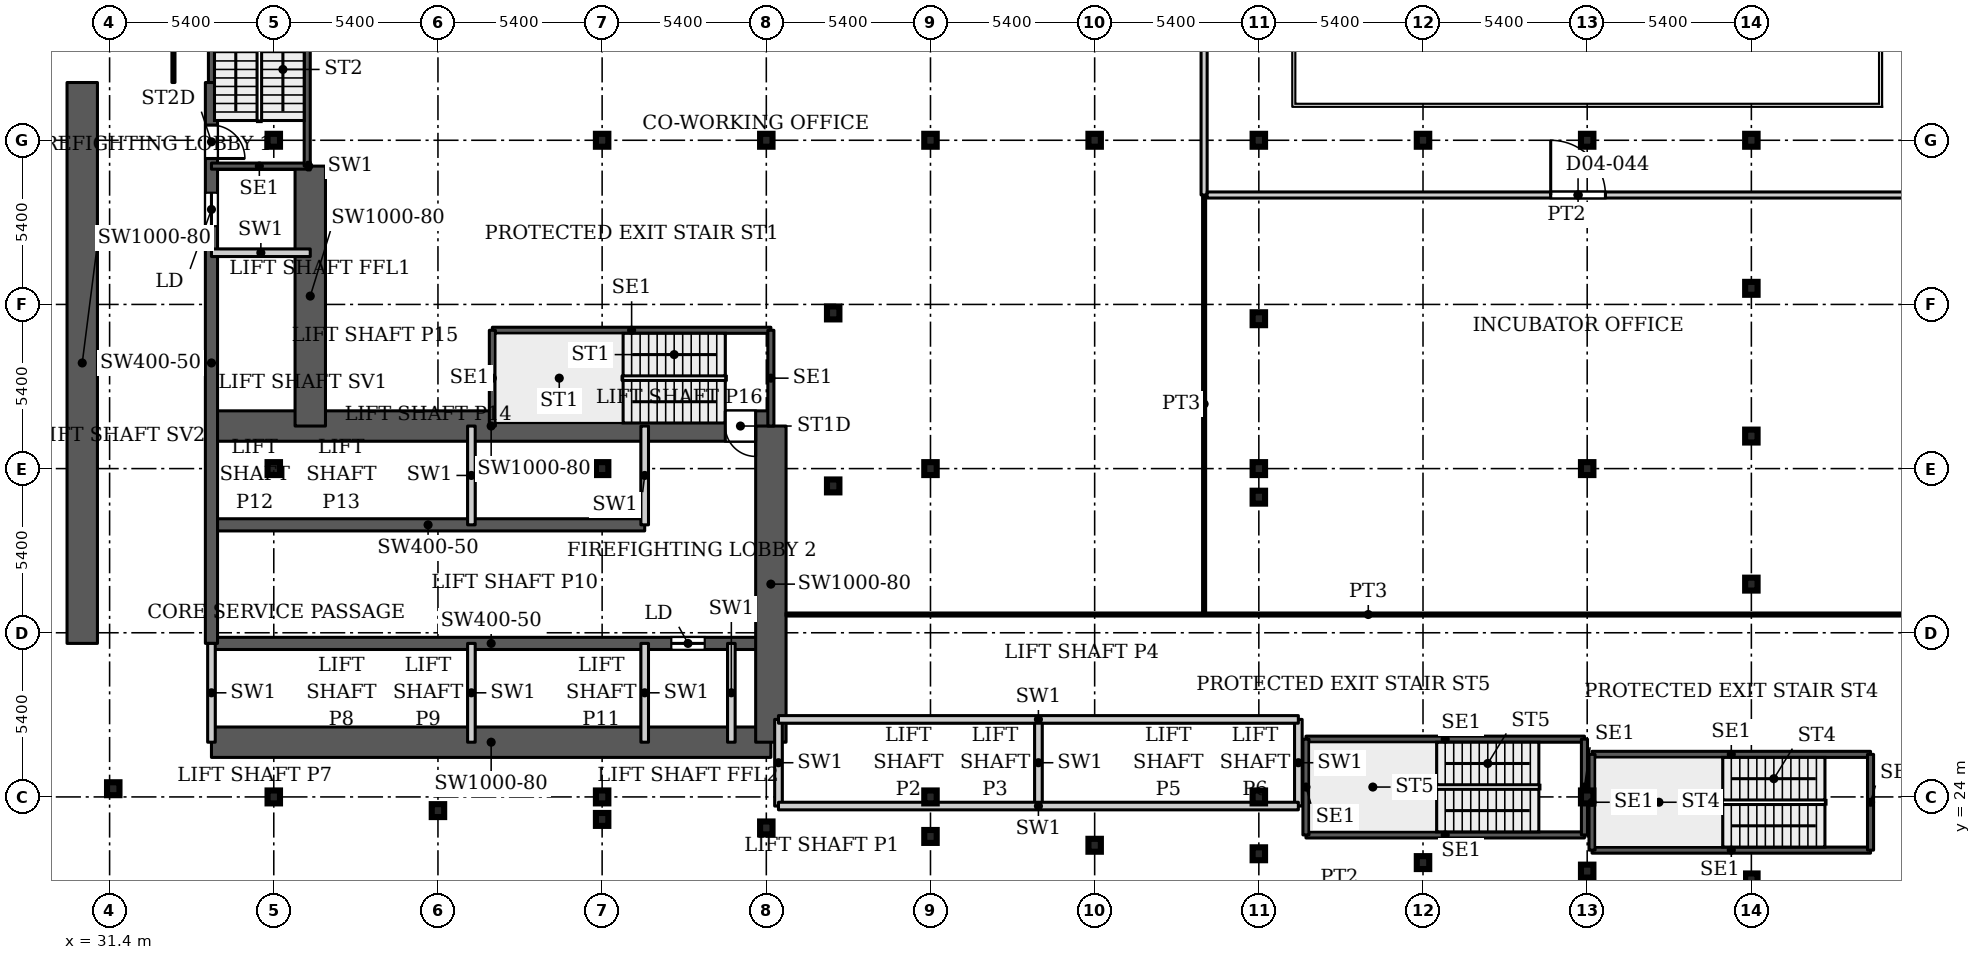
"""IFC4 building model, lengths in metres.
Left out: names, types, materials, properties, quantities, classifications, styles, units other than length and angle.
Written with IfcOpenShell. Run it as: python <this file> out.ifc"""

import sys

from ifc_helpers import new_model, si_unit, direction, frame, frame_2d, origin, origin_2d, place, context, subcontext, project, spatial, rectangle, i_section, extrude, source, transform, mapped, element, fill, save


model = new_model("IFC4")
c1 = context("Model", 3, precision=1e-05, world=origin(), true_north=direction((0.0, 1.0)))
c2 = subcontext(c1, "Body", "Model", "MODEL_VIEW")
j1 = project(units=[si_unit("LENGTHUNIT", "METRE"), si_unit("PLANEANGLEUNIT", "RADIAN")], contexts=[c1])
p1 = place(None, origin())
s1 = spatial("IfcSite", under=j1, at=p1, CompositionType="ELEMENT")
p2 = place(p1, origin())
s2 = spatial("IfcBuilding", under=s1, at=p2, CompositionType="ELEMENT")
p3 = place(p2, frame((0.0, 0.0, 21.5)))
s3 = spatial("IfcBuildingStorey", under=s2, at=p3, CompositionType="ELEMENT", Elevation=21.5)
for number, where, z_axis, x_axis in (
    (1, (36.8, 24.0, 0.0), (0.0, 0.0, 1.0), (1.0, 0.0, 0.0)),
    (2, (47.6, 24.0, 0.0), (0.0, 0.0, 1.0), (1.0, 0.0, 0.0)),
    (3, (58.4, 24.0, 0.0), (0.0, 0.0, 1.0), (1.0, 0.0, 0.0)),
    (4, (69.2, 24.0, 0.0), (0.0, 0.0, 1.0), (1.0, 0.0, 0.0)),
    (5, (80.0, 24.0, 0.0), (0.0, 0.0, 1.0), (1.0, 0.0, 0.0)),
    (6, (36.8, 34.8, 0.0), (0.0, 0.0, 1.0), (1.0, 0.0, 0.0)),
    (7, (47.6, 34.8, 0.0), (0.0, 0.0, 1.0), (1.0, 0.0, 0.0)),
    (8, (58.4, 34.8, 0.0), (0.0, 0.0, 1.0), (1.0, 0.0, 0.0)),
    (9, (69.2, 34.8, 0.0), (0.0, 0.0, 1.0), (1.0, 0.0, 0.0)),
    (10, (80.0, 34.8, 0.0), (0.0, 0.0, 1.0), (1.0, 0.0, 0.0)),
    (11, (36.8, 45.6, 0.0), (0.0, 0.0, 1.0), (1.0, 0.0, 0.0)),
    (12, (47.6, 45.6, 0.0), (0.0, 0.0, 1.0), (1.0, 0.0, 0.0)),
    (13, (58.4, 45.6, 0.0), (0.0, 0.0, 1.0), (1.0, 0.0, 0.0)),
    (14, (69.2, 45.6, 0.0), (0.0, 0.0, 1.0), (1.0, 0.0, 0.0)),
    (15, (80.0, 45.6, 0.0), (0.0, 0.0, 1.0), (1.0, 0.0, 0.0)),
    (16, (85.4, 21.27, 0.0), (0.0, 0.0, 1.0), (1.0, 0.0, 0.0)),
    (17, (80.0, 21.56, 0.0), (0.0, 0.0, 1.0), (1.0, 0.0, 0.0)),
    (18, (74.6, 21.84, 0.0), (0.0, 0.0, 1.0), (1.0, 0.0, 0.0)),
    (19, (69.2, 22.13, 0.0), (0.0, 0.0, 1.0), (1.0, 0.0, 0.0)),
    (20, (63.8, 22.41, 0.0), (0.0, 0.0, 1.0), (1.0, 0.0, 0.0)),
    (21, (58.4, 22.7, 0.0), (0.0, 0.0, 1.0), (1.0, 0.0, 0.0)),
    (22, (53.0, 22.98, 0.0), (0.0, 0.0, 1.0), (1.0, 0.0, 0.0)),
    (23, (47.6, 23.26, 0.0), (0.0, 0.0, 1.0), (1.0, 0.0, 0.0)),
    (24, (42.2, 23.55, 0.0), (0.0, 0.0, 1.0), (1.0, 0.0, 0.0)),
    (25, (31.52, 24.27, 0.0), (0.0, 0.0, 1.0), (1.0, 0.0, 0.0)),
    (26, (53.0, 45.6, 0.0), (0.0, 0.0, 1.0), (1.0, 0.0, 0.0)),
    (27, (63.8, 45.6, 0.0), (0.0, 0.0, 1.0), (1.0, 0.0, 0.0)),
    (28, (74.6, 45.6, 0.0), (0.0, 0.0, 1.0), (1.0, 0.0, 0.0)),
    (29, (85.4, 45.6, 0.0), (0.0, 0.0, 1.0), (1.0, 0.0, 0.0)),
    (30, (85.4, 31.0, 0.0), (0.0, 0.0, 1.0), (1.0, 0.0, 0.0)),
    (31, (69.2, 33.86, 0.0), (0.0, 0.0, 1.0), (1.0, 0.0, 0.0)),
    (32, (55.2, 34.23, 0.0), (0.0, 0.0, 1.0), (1.0, 0.0, 0.0)),
    (33, (85.4, 35.87, 0.0), (0.0, 0.0, 1.0), (1.0, 0.0, 0.0)),
    (34, (69.2, 39.73, 0.0), (0.0, 0.0, 1.0), (1.0, 0.0, 0.0)),
    (35, (55.2, 39.92, 0.0), (0.0, 0.0, 1.0), (1.0, 0.0, 0.0)),
    (36, (85.4, 40.73, 0.0), (0.0, 0.0, 1.0), (1.0, 0.0, 0.0)),
):
    element("IfcColumn", number, at=place(p3, frame(where, z_axis=z_axis, x_axis=x_axis)), inside=s3, PredefinedType="COLUMN", context=c2, shape_type="SweptSolid", body=[
        extrude(i_section(OverallWidth=0.409, OverallDepth=0.425, WebThickness=0.033, FlangeThickness=0.052, FilletRadius=0.013, at=origin_2d()), origin(), (0.0, 0.0, 1.0), 4.5),
    ])
p4 = place(p3, frame((34.75, 25.8, 0.0), z_axis=(0.0, 0.0, 1.0), x_axis=(1.0, 0.0, 0.0)))
e37 = element("IfcWall", 37, at=p4, inside=s3, PredefinedType="SHEAR", context=c2, shape_type="SweptSolid", body=[
    extrude(rectangle(XDim=18.4, YDim=1.0, at=frame_2d((9.2, 0.0))), origin(), (0.0, 0.0, 1.0), 4.5),
])
p5 = place(p3, frame((34.75, 29.05, 0.0), z_axis=(0.0, 0.0, 1.0), x_axis=(1.0, 0.0, 0.0)))
e38 = element("IfcWall", 38, at=p5, inside=s3, PredefinedType="SHEAR", context=c2, shape_type="SweptSolid", body=[
    extrude(rectangle(XDim=18.4, YDim=0.4, at=frame_2d((9.2, 0.0))), origin(), (0.0, 0.0, 1.0), 4.5),
])
p6 = place(p5, frame((15.125, 0.0, 0.0)))
e39 = element("IfcOpeningElement", 39, at=p6, cuts=e38, PredefinedType="OPENING", context=c2, shape_type="SweptSolid", body=[
    extrude(rectangle(XDim=1.1, YDim=2.2, at=frame_2d((0.55, 1.1))), frame((0.0, 0.21, 0.0), z_axis=(0.0, -1.0, 0.0), x_axis=(1.0, 0.0, 0.0)), (0.0, 0.0, 1.0), 0.42),
])
p7 = place(p3, frame((34.75, 32.95, 0.0), z_axis=(0.0, 0.0, 1.0), x_axis=(1.0, 0.0, 0.0)))
e40 = element("IfcWall", 40, at=p7, inside=s3, PredefinedType="SHEAR", context=c2, shape_type="SweptSolid", body=[
    extrude(rectangle(XDim=14.25, YDim=0.4, at=frame_2d((7.125, 0.0))), origin(), (0.0, 0.0, 1.0), 4.5),
])
p8 = place(p3, frame((34.75, 36.2, 0.0), z_axis=(0.0, 0.0, 1.0), x_axis=(1.0, 0.0, 0.0)))
e41 = element("IfcWall", 41, at=p8, inside=s3, PredefinedType="SHEAR", context=c2, shape_type="SweptSolid", body=[
    extrude(rectangle(XDim=18.4, YDim=1.0, at=frame_2d((9.2, 0.0))), origin(), (0.0, 0.0, 1.0), 4.5),
])
p9 = place(p8, frame((16.9, 0.0, 0.0)))
e42 = element("IfcOpeningElement", 42, at=p9, cuts=e41, PredefinedType="OPENING", context=c2, shape_type="SweptSolid", body=[
    extrude(rectangle(XDim=1.0, YDim=2.2, at=frame_2d((0.5, 1.1))), frame((0.0, 0.51, 0.0), z_axis=(0.0, -1.0, 0.0), x_axis=(1.0, 0.0, 0.0)), (0.0, 0.0, 1.0), 1.02),
])
p10 = place(p3, frame((34.75, 29.05, 0.0), z_axis=(0.0, 0.0, 1.0), x_axis=(0.0, 1.0, 0.0)))
e43 = element("IfcWall", 43, at=p10, inside=s3, PredefinedType="SHEAR", context=c2, shape_type="SweptSolid", body=[
    extrude(rectangle(XDim=18.45, YDim=0.4, at=frame_2d((9.225, 0.0))), origin(), (0.0, 0.0, 1.0), 4.5),
])
p11 = place(p10, frame((13.725, 0.0, 0.0)))
e44 = element("IfcOpeningElement", 44, at=p11, cuts=e43, PredefinedType="OPENING", context=c2, shape_type="SweptSolid", body=[
    extrude(rectangle(XDim=1.1, YDim=2.2, at=frame_2d((0.55, 1.1))), frame((0.0, 0.21, 0.0), z_axis=(0.0, -1.0, 0.0), x_axis=(1.0, 0.0, 0.0)), (0.0, 0.0, 1.0), 0.42),
])
p12 = place(p10, frame((15.95, 0.0, 0.0)))
e45 = element("IfcOpeningElement", 45, at=p12, cuts=e43, PredefinedType="OPENING", context=c2, shape_type="SweptSolid", body=[
    extrude(rectangle(XDim=1.1, YDim=2.2, at=frame_2d((0.55, 1.1))), frame((0.0, 0.21, 0.0), z_axis=(0.0, -1.0, 0.0), x_axis=(1.0, 0.0, 0.0)), (0.0, 0.0, 1.0), 0.42),
])
p13 = place(p3, frame((38.0, 36.2, 0.0), z_axis=(0.0, 0.0, 1.0), x_axis=(0.0, 1.0, 0.0)))
e46 = element("IfcWall", 46, at=p13, inside=s3, PredefinedType="SHEAR", context=c2, shape_type="SweptSolid", body=[
    extrude(rectangle(XDim=8.55, YDim=1.0, at=frame_2d((4.275, 0.0))), origin(), (0.0, 0.0, 1.0), 4.5),
])
p14 = place(p3, frame((30.5, 29.05, 0.0), z_axis=(0.0, 0.0, 1.0), x_axis=(0.0, 1.0, 0.0)))
e47 = element("IfcWall", 47, at=p14, inside=s3, PredefinedType="SHEAR", context=c2, shape_type="SweptSolid", body=[
    extrude(rectangle(XDim=18.45, YDim=1.0, at=frame_2d((9.225, 0.0))), origin(), (0.0, 0.0, 1.0), 4.5),
])
p15 = place(p3, frame((53.15, 25.8, 0.0), z_axis=(0.0, 0.0, 1.0), x_axis=(0.0, 1.0, 0.0)))
e48 = element("IfcWall", 48, at=p15, inside=s3, PredefinedType="SHEAR", context=c2, shape_type="SweptSolid", body=[
    extrude(rectangle(XDim=10.4, YDim=1.0, at=frame_2d((5.2, 0.0))), origin(), (0.0, 0.0, 1.0), 4.5),
])
p16 = place(p3, frame((43.99, 39.35, 0.0), z_axis=(0.0, 0.0, 1.0), x_axis=(1.0, 0.0, 0.0)))
e49 = element("IfcWall", 49, at=p16, inside=s3, PredefinedType="SHEAR", context=c2, shape_type="SweptSolid", body=[
    extrude(rectangle(XDim=9.16, YDim=0.2, at=frame_2d((4.58, 0.0))), origin(), (0.0, 0.0, 1.0), 4.5),
])
for number, where, z_axis, x_axis in (
    (50, (43.99, 36.2, 0.0), (0.0, 0.0, 1.0), (0.0, 1.0, 0.0)),
    (51, (53.15, 36.2, 0.0), (0.0, 0.0, 1.0), (0.0, 1.0, 0.0)),
):
    element("IfcWall", number, at=place(p3, frame(where, z_axis=z_axis, x_axis=x_axis)), inside=s3, PredefinedType="SHEAR", context=c2, shape_type="SweptSolid", body=[
        extrude(rectangle(XDim=3.15, YDim=0.2, at=frame_2d((1.575, 0.0))), origin(), (0.0, 0.0, 1.0), 4.5),
    ])
p17 = place(p3, frame((34.75, 44.75, 0.0), z_axis=(0.0, 0.0, 1.0), x_axis=(1.0, 0.0, 0.0)))
e52 = element("IfcWall", 52, at=p17, inside=s3, PredefinedType="SHEAR", context=c2, shape_type="SweptSolid", body=[
    extrude(rectangle(XDim=3.15, YDim=0.2, at=frame_2d((1.575, 0.0))), origin(), (0.0, 0.0, 1.0), 4.5),
])
p18 = place(p3, frame((34.75, 47.5, 0.0), z_axis=(0.0, 0.0, 1.0), x_axis=(0.0, 1.0, 0.0)))
e53 = element("IfcWall", 53, at=p18, inside=s3, PredefinedType="SHEAR", context=c2, shape_type="SweptSolid", body=[
    extrude(rectangle(XDim=6.41, YDim=0.2, at=frame_2d((3.205, 0.0))), origin(), (0.0, 0.0, 1.0), 4.5),
])
p19 = place(p3, frame((37.9, 44.75, 0.0), z_axis=(0.0, 0.0, 1.0), x_axis=(0.0, 1.0, 0.0)))
e54 = element("IfcWall", 54, at=p19, inside=s3, PredefinedType="SHEAR", context=c2, shape_type="SweptSolid", body=[
    extrude(rectangle(XDim=9.16, YDim=0.2, at=frame_2d((4.58, 0.0))), origin(), (0.0, 0.0, 1.0), 4.5),
])
for number, where, z_axis, x_axis in (
    (55, (80.16, 22.25, 0.0), (0.0, 0.0, 1.0), (1.0, 0.0, 0.0)),
    (56, (80.16, 25.4, 0.0), (0.0, 0.0, 1.0), (1.0, 0.0, 0.0)),
):
    element("IfcWall", number, at=place(p3, frame(where, z_axis=z_axis, x_axis=x_axis)), inside=s3, PredefinedType="SHEAR", context=c2, shape_type="SweptSolid", body=[
        extrude(rectangle(XDim=9.16, YDim=0.2, at=frame_2d((4.58, 0.0))), origin(), (0.0, 0.0, 1.0), 4.5),
    ])
for number, where, z_axis, x_axis in (
    (57, (80.16, 22.25, 0.0), (0.0, 0.0, 1.0), (0.0, 1.0, 0.0)),
    (58, (89.32, 22.25, 0.0), (0.0, 0.0, 1.0), (0.0, 1.0, 0.0)),
):
    element("IfcWall", number, at=place(p3, frame(where, z_axis=z_axis, x_axis=x_axis)), inside=s3, PredefinedType="SHEAR", context=c2, shape_type="SweptSolid", body=[
        extrude(rectangle(XDim=3.15, YDim=0.2, at=frame_2d((1.575, 0.0))), origin(), (0.0, 0.0, 1.0), 4.5),
    ])
for number, where, z_axis, x_axis in (
    (59, (70.75, 22.75, 0.0), (0.0, 0.0, 1.0), (1.0, 0.0, 0.0)),
    (60, (70.75, 25.9, 0.0), (0.0, 0.0, 1.0), (1.0, 0.0, 0.0)),
):
    element("IfcWall", number, at=place(p3, frame(where, z_axis=z_axis, x_axis=x_axis)), inside=s3, PredefinedType="SHEAR", context=c2, shape_type="SweptSolid", body=[
        extrude(rectangle(XDim=9.16, YDim=0.2, at=frame_2d((4.58, 0.0))), origin(), (0.0, 0.0, 1.0), 4.5),
    ])
for number, where, z_axis, x_axis in (
    (61, (70.75, 22.75, 0.0), (0.0, 0.0, 1.0), (0.0, 1.0, 0.0)),
    (62, (79.91, 22.75, 0.0), (0.0, 0.0, 1.0), (0.0, 1.0, 0.0)),
):
    element("IfcWall", number, at=place(p3, frame(where, z_axis=z_axis, x_axis=x_axis)), inside=s3, PredefinedType="SHEAR", context=c2, shape_type="SweptSolid", body=[
        extrude(rectangle(XDim=3.15, YDim=0.2, at=frame_2d((1.575, 0.0))), origin(), (0.0, 0.0, 1.0), 4.5),
    ])
for number, where, z_axis, x_axis in (
    (63, (34.75, 25.8, 0.0), (0.0, 0.0, 1.0), (0.0, 1.0, 0.0)),
    (64, (43.3, 25.8, 0.0), (0.0, 0.0, 1.0), (0.0, 1.0, 0.0)),
    (65, (43.3, 32.95, 0.0), (0.0, 0.0, 1.0), (0.0, 1.0, 0.0)),
    (66, (49.0, 25.8, 0.0), (0.0, 0.0, 1.0), (0.0, 1.0, 0.0)),
    (67, (49.0, 32.95, 0.0), (0.0, 0.0, 1.0), (0.0, 1.0, 0.0)),
    (68, (51.85, 25.8, 0.0), (0.0, 0.0, 1.0), (0.0, 1.0, 0.0)),
):
    element("IfcWall", number, at=place(p3, frame(where, z_axis=z_axis, x_axis=x_axis)), inside=s3, PredefinedType="PARTITIONING", context=c2, shape_type="SweptSolid", body=[
        extrude(rectangle(XDim=3.25, YDim=0.25, at=frame_2d((1.625, 0.0))), origin(), (0.0, 0.0, 1.0), 4.5),
    ])
for number, where, z_axis, x_axis in (
    (69, (53.4, 23.7, 0.0), (0.0, 0.0, 1.0), (0.0, 1.0, 0.0)),
    (70, (61.95, 23.7, 0.0), (0.0, 0.0, 1.0), (0.0, 1.0, 0.0)),
    (71, (70.5, 23.7, 0.0), (0.0, 0.0, 1.0), (0.0, 1.0, 0.0)),
):
    element("IfcWall", number, at=place(p3, frame(where, z_axis=z_axis, x_axis=x_axis)), inside=s3, PredefinedType="PARTITIONING", context=c2, shape_type="SweptSolid", body=[
        extrude(rectangle(XDim=2.85, YDim=0.25, at=frame_2d((1.425, 0.0))), origin(), (0.0, 0.0, 1.0), 4.5),
    ])
for number, where, z_axis, x_axis in (
    (72, (53.4, 23.7, 0.0), (0.0, 0.0, 1.0), (1.0, 0.0, 0.0)),
    (73, (53.4, 26.55, 0.0), (0.0, 0.0, 1.0), (1.0, 0.0, 0.0)),
):
    element("IfcWall", number, at=place(p3, frame(where, z_axis=z_axis, x_axis=x_axis)), inside=s3, PredefinedType="PARTITIONING", context=c2, shape_type="SweptSolid", body=[
        extrude(rectangle(XDim=17.1, YDim=0.25, at=frame_2d((8.55, 0.0))), origin(), (0.0, 0.0, 1.0), 4.5),
    ])
p20 = place(p3, frame((34.75, 41.9, 0.0), z_axis=(0.0, 0.0, 1.0), x_axis=(1.0, 0.0, 0.0)))
e74 = element("IfcWall", 74, at=p20, inside=s3, PredefinedType="PARTITIONING", context=c2, shape_type="SweptSolid", body=[
    extrude(rectangle(XDim=3.25, YDim=0.25, at=frame_2d((1.625, 0.0))), origin(), (0.0, 0.0, 1.0), 4.5),
])
p21 = place(p3, frame((37.9, 44.75, 0.0), z_axis=(0.0, 0.0, 1.0), x_axis=(1.0, 0.0, 0.0)))
e75 = element("IfcWall", 75, at=p21, inside=s3, PredefinedType="PARTITIONING", context=c2, shape_type="SweptSolid", body=[
    extrude(rectangle(XDim=0.1, YDim=0.25, at=frame_2d((0.05, 0.0))), origin(), (0.0, 0.0, 1.0), 4.5),
])
p22 = place(p3, frame((33.5, 47.5, 0.0), z_axis=(0.0, 0.0, 1.0), x_axis=(0.0, 1.0, 0.0)))
e76 = element("IfcWall", 76, at=p22, inside=s3, PredefinedType="PARTITIONING", context=c2, shape_type="SweptSolid", body=[
    extrude(rectangle(XDim=12.45, YDim=0.1, at=frame_2d((6.225, 0.0))), origin(), (0.0, 0.0, 1.0), 4.18),
])
p23 = place(p3, frame((53.649, 30.0, 0.0), z_axis=(0.0, 0.0, 1.0), x_axis=(1.0, 0.0, 0.0)))
e77 = element("IfcWall", 77, at=p23, inside=s3, PredefinedType="PARTITIONING", context=c2, shape_type="SweptSolid", body=[
    extrude(rectangle(XDim=38.301, YDim=0.1, at=frame_2d((19.15, 0.0))), origin(), (0.0, 0.0, 1.0), 4.18),
])
p24 = place(p3, frame((67.4, 30.05, 0.0), z_axis=(0.0, 0.0, 1.0), x_axis=(0.0, 1.0, 0.0)))
e78 = element("IfcWall", 78, at=p24, inside=s3, PredefinedType="PARTITIONING", context=c2, shape_type="SweptSolid", body=[
    extrude(rectangle(XDim=13.75, YDim=0.1, at=frame_2d((6.875, 0.0))), origin(), (0.0, 0.0, 1.0), 4.18),
])
p25 = place(p3, frame((67.4, 43.8, 0.0), z_axis=(0.0, 0.0, 1.0), x_axis=(0.0, 1.0, 0.0)))
e79 = element("IfcWall", 79, at=p25, inside=s3, PredefinedType="PARTITIONING", context=c2, shape_type="SweptSolid", body=[
    extrude(rectangle(XDim=25.2, YDim=0.2, at=frame_2d((12.6, 0.0))), origin(), (0.0, 0.0, 1.0), 4.18),
])
p26 = place(p25, frame((7.25, 0.0, 0.0)))
e80 = element("IfcOpeningElement", 80, at=p26, cuts=e79, PredefinedType="OPENING", context=c2, shape_type="SweptSolid", body=[
    extrude(rectangle(XDim=1.8, YDim=2.1, at=frame_2d((0.9, 1.05))), frame((0.0, 0.11, 0.0), z_axis=(0.0, -1.0, 0.0), x_axis=(1.0, 0.0, 0.0)), (0.0, 0.0, 1.0), 0.22),
])
p27 = place(p25, frame((19.75, 0.0, 0.0)))
e81 = element("IfcOpeningElement", 81, at=p27, cuts=e79, PredefinedType="OPENING", context=c2, shape_type="SweptSolid", body=[
    extrude(rectangle(XDim=1.8, YDim=2.1, at=frame_2d((0.9, 1.05))), frame((0.0, 0.11, 0.0), z_axis=(0.0, -1.0, 0.0), x_axis=(1.0, 0.0, 0.0)), (0.0, 0.0, 1.0), 0.22),
])
p28 = place(p3, frame((67.5, 43.8, 0.0), z_axis=(0.0, 0.0, 1.0), x_axis=(1.0, 0.0, 0.0)))
e82 = element("IfcWall", 82, at=p28, inside=s3, PredefinedType="PARTITIONING", context=c2, shape_type="SweptSolid", body=[
    extrude(rectangle(XDim=24.4, YDim=0.2, at=frame_2d((12.2, 0.0))), origin(), (0.0, 0.0, 1.0), 4.18),
])
p29 = place(p28, frame((11.3, 0.0, 0.0)))
e83 = element("IfcOpeningElement", 83, at=p29, cuts=e82, PredefinedType="OPENING", context=c2, shape_type="SweptSolid", body=[
    extrude(rectangle(XDim=1.8, YDim=2.1, at=frame_2d((0.9, 1.05))), frame((0.0, 0.11, 0.0), z_axis=(0.0, -1.0, 0.0), x_axis=(1.0, 0.0, 0.0)), (0.0, 0.0, 1.0), 0.22),
])
m1 = source(origin(), c2, "Body", "SweptSolid", [
    extrude(rectangle(XDim=1.1, YDim=2.2, at=frame_2d((0.55, 1.1))), frame((0.0, 0.025, 0.0), z_axis=(0.0, -1.0, 0.0), x_axis=(1.0, 0.0, 0.0)), (0.0, 0.0, 1.0), 0.05),
])
p30 = place(p11, origin())
e84 = element("IfcDoor", 84, at=p30, inside=s3, OperationType="SLIDING_TO_LEFT", PredefinedType="DOOR", context=c2, shape_type="MappedRepresentation", body=[
    mapped(m1, transform((0.0, 0.0, 0.0), x_axis=(1.0, 0.0, 0.0), y_axis=(0.0, 1.0, 0.0), z_axis=(0.0, 0.0, 1.0), scale=1.0)),
])
fill(e44, e84)
p31 = place(p6, origin())
e85 = element("IfcDoor", 85, at=p31, inside=s3, OperationType="SLIDING_TO_LEFT", PredefinedType="DOOR", context=c2, shape_type="MappedRepresentation", body=[
    mapped(m1, transform((0.0, 0.0, 0.0), x_axis=(1.0, 0.0, 0.0), y_axis=(0.0, 1.0, 0.0), z_axis=(0.0, 0.0, 1.0), scale=1.0)),
])
fill(e39, e85)
m2 = source(origin(), c2, "Body", "SweptSolid", [
    extrude(rectangle(XDim=1.0, YDim=2.2, at=frame_2d((0.5, 1.1))), frame((0.0, 0.025, 0.0), z_axis=(0.0, -1.0, 0.0), x_axis=(1.0, 0.0, 0.0)), (0.0, 0.0, 1.0), 0.05),
])
p32 = place(p9, origin())
e86 = element("IfcDoor", 86, at=p32, inside=s3, OperationType="SINGLE_SWING_RIGHT", PredefinedType="DOOR", context=c2, shape_type="MappedRepresentation", body=[
    mapped(m2, transform((0.0, 0.0, 0.0), x_axis=(1.0, 0.0, 0.0), y_axis=(0.0, 1.0, 0.0), z_axis=(0.0, 0.0, 1.0), scale=1.0)),
])
fill(e42, e86)
m3 = source(origin(), c2, "Body", "SweptSolid", [
    extrude(rectangle(XDim=1.1, YDim=2.2, at=frame_2d((0.55, 1.1))), frame((0.0, 0.025, 0.0), z_axis=(0.0, -1.0, 0.0), x_axis=(1.0, 0.0, 0.0)), (0.0, 0.0, 1.0), 0.05),
])
p33 = place(p12, origin())
e87 = element("IfcDoor", 87, at=p33, inside=s3, OperationType="SINGLE_SWING_RIGHT", PredefinedType="DOOR", context=c2, shape_type="MappedRepresentation", body=[
    mapped(m3, transform((0.0, 0.0, 0.0), x_axis=(1.0, 0.0, 0.0), y_axis=(0.0, 1.0, 0.0), z_axis=(0.0, 0.0, 1.0), scale=1.0)),
])
fill(e45, e87)
m4 = source(origin(), c2, "Body", "SweptSolid", [
    extrude(rectangle(XDim=1.8, YDim=2.1, at=frame_2d((0.9, 1.05))), frame((0.0, 0.025, 0.0), z_axis=(0.0, -1.0, 0.0), x_axis=(1.0, 0.0, 0.0)), (0.0, 0.0, 1.0), 0.05),
])
p34 = place(p29, origin())
e88 = element("IfcDoor", 88, at=p34, inside=s3, OperationType="DOUBLE_DOOR_SINGLE_SWING", PredefinedType="DOOR", context=c2, shape_type="MappedRepresentation", body=[
    mapped(m4, transform((0.0, 0.0, 0.0), x_axis=(1.0, 0.0, 0.0), y_axis=(0.0, 1.0, 0.0), z_axis=(0.0, 0.0, 1.0), scale=1.0)),
])
fill(e83, e88)
save(model, sys.argv[1])
